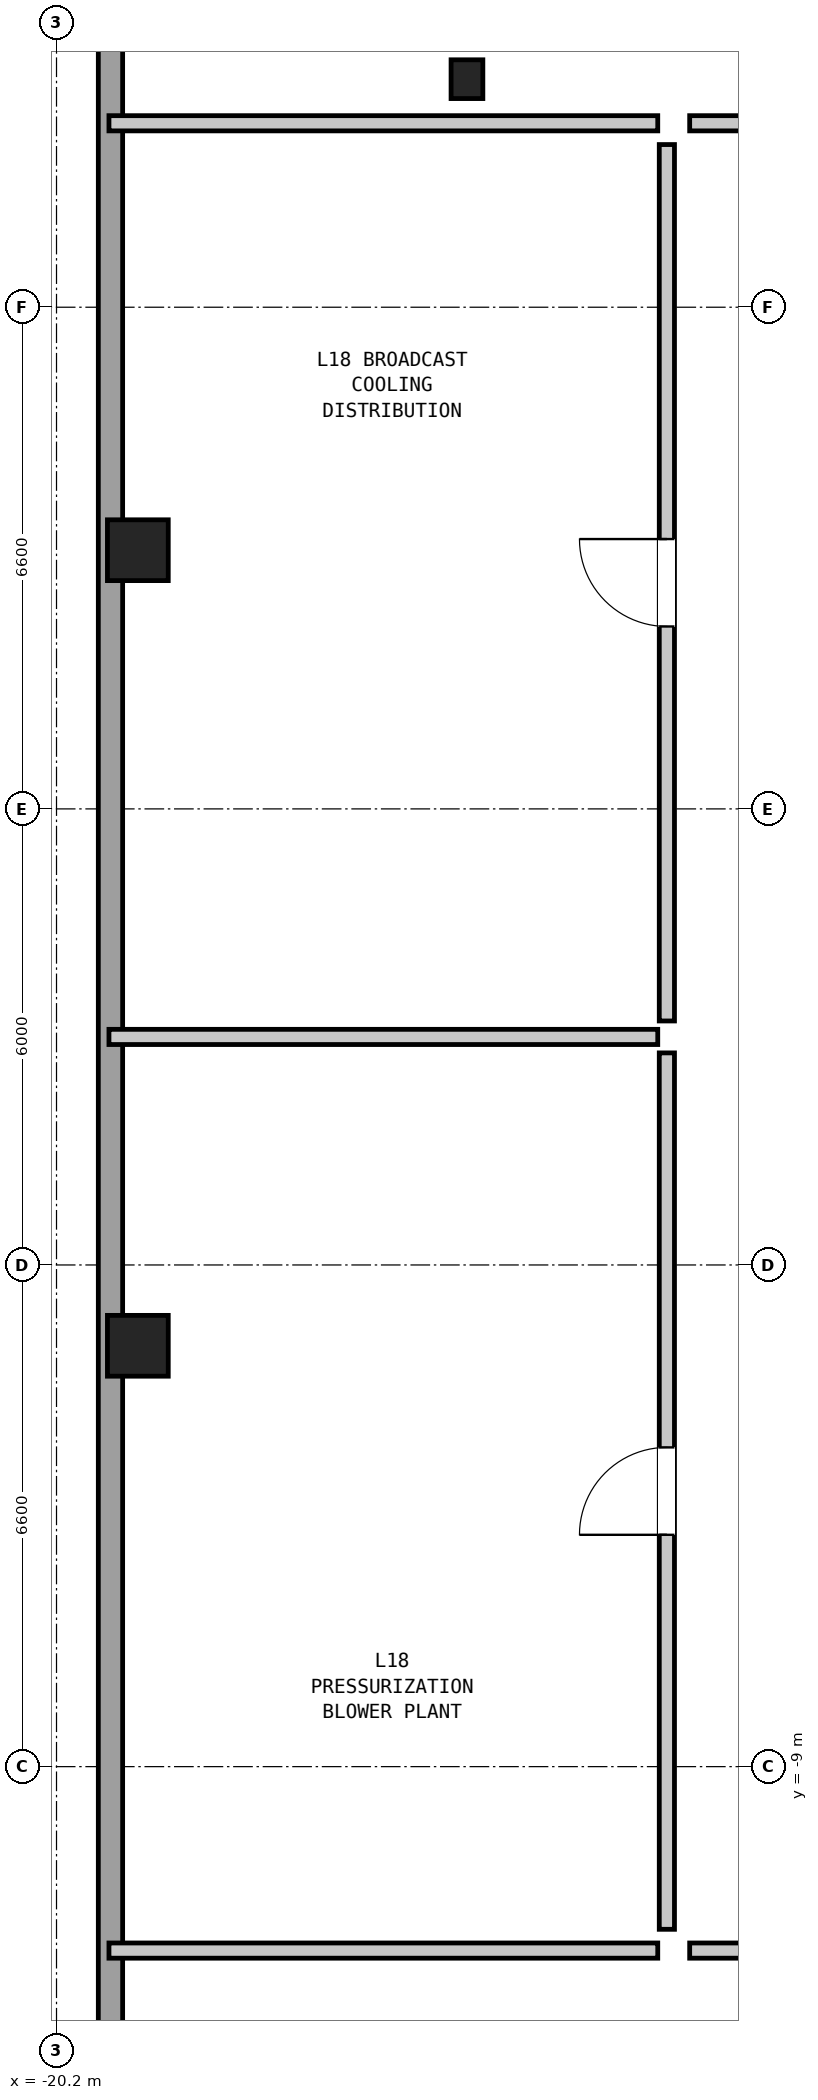
"""IFC4 building model, lengths in metres.
Left out: names, types, materials, properties, quantities, classifications, styles, units other than length and angle.
Written with IfcOpenShell. Run it as: python <this file> out.ifc"""

import sys

from ifc_helpers import new_model, si_unit, direction, frame, frame_2d, origin, origin_2d, place, context, subcontext, project, spatial, rectangle, hollow_rectangle, i_section, extrude, element, fill, save


model = new_model("IFC4")
c1 = context("Model", 3, precision=1e-05, world=origin(), true_north=direction((0.0, 1.0)))
c2 = subcontext(c1, "Body", "Model", "MODEL_VIEW")
j1 = project(units=[si_unit("LENGTHUNIT", "METRE"), si_unit("PLANEANGLEUNIT", "RADIAN")], contexts=[c1])
p1 = place(None, origin())
s1 = spatial("IfcSite", under=j1, at=p1, CompositionType="ELEMENT")
p2 = place(p1, origin())
s2 = spatial("IfcBuilding", under=s1, at=p2, CompositionType="ELEMENT")
p3 = place(p2, frame((0.0, 0.0, 65.1)))
s3 = spatial("IfcBuildingStorey", under=s2, at=p3, CompositionType="ELEMENT", Elevation=65.1)
for number, where, z_axis, x_axis in (
    (1, (-19.13, 7.003, 0.0), (0.0, 0.0, 1.0), (0.0, 1.0, 0.0)),
    (2, (-19.13, -3.463, 0.0), (0.0, 0.0, 1.0), (0.0, 1.0, 0.0)),
):
    element("IfcColumn", number, at=place(p3, frame(where, z_axis=z_axis, x_axis=x_axis)), inside=s3, PredefinedType="COLUMN", context=c2, shape_type="SweptSolid", body=[
        extrude(hollow_rectangle(XDim=0.8, YDim=0.8, WallThickness=0.05, at=origin_2d()), origin(), (0.0, 0.0, 1.0), 4.35),
    ])
p4 = place(p3, frame((-14.8, 13.2, 0.0), z_axis=(0.0, 0.0, 1.0), x_axis=(1.0, 0.0, 0.0)))
e3 = element("IfcColumn", 3, at=p4, inside=s3, PredefinedType="COLUMN", context=c2, shape_type="SweptSolid", body=[
    extrude(i_section(OverallWidth=0.418, OverallDepth=0.51, WebThickness=0.042, FlangeThickness=0.068, at=origin_2d()), origin(), (0.0, 0.0, 1.0), 4.35),
])
p5 = place(p3, frame((-19.49, -13.542, 0.0), z_axis=(0.0, 0.0, 1.0), x_axis=(0.0, 1.0, 0.0)))
e4 = element("IfcWall", 4, at=p5, inside=s3, PredefinedType="SOLIDWALL", context=c2, shape_type="SweptSolid", body=[
    extrude(rectangle(XDim=30.624, YDim=0.32, at=frame_2d((15.312, 0.0))), origin(), (0.0, 0.0, 1.0), 2.31),
])
p6 = place(p3, frame((-11.87, 12.62, 0.0), z_axis=(0.0, 0.0, 1.0), x_axis=(1.0, 0.0, 0.0)))
e5 = element("IfcWall", 5, at=p6, inside=s3, PredefinedType="PARTITIONING", context=c2, shape_type="SweptSolid", body=[
    extrude(rectangle(XDim=5.89, YDim=0.2, at=frame_2d((2.945, 0.0))), origin(), (0.0, 0.0, 1.0), 4.13),
])
p7 = place(p6, frame((2.37, 0.0, 0.0)))
e6 = element("IfcOpeningElement", 6, at=p7, cuts=e5, PredefinedType="OPENING", context=c2, shape_type="SweptSolid", body=[
    extrude(rectangle(XDim=1.15, YDim=2.1, at=frame_2d((0.575, 1.05))), frame((0.0, 0.112, 0.0), z_axis=(0.0, -1.0, 0.0), x_axis=(1.0, 0.0, 0.0)), (0.0, 0.0, 1.0), 0.224),
])
p8 = place(p3, frame((-11.87, -11.42, 0.0), z_axis=(0.0, 0.0, 1.0), x_axis=(1.0, 0.0, 0.0)))
e7 = element("IfcWall", 7, at=p8, inside=s3, PredefinedType="PARTITIONING", context=c2, shape_type="SweptSolid", body=[
    extrude(rectangle(XDim=5.89, YDim=0.2, at=frame_2d((2.945, 0.0))), origin(), (0.0, 0.0, 1.0), 3.574),
])
p9 = place(p8, frame((2.37, 0.0, 0.0)))
e8 = element("IfcOpeningElement", 8, at=p9, cuts=e7, PredefinedType="OPENING", context=c2, shape_type="SweptSolid", body=[
    extrude(rectangle(XDim=1.15, YDim=2.1, at=frame_2d((0.575, 1.05))), frame((0.0, 0.112, 0.0), z_axis=(0.0, -1.0, 0.0), x_axis=(1.0, 0.0, 0.0)), (0.0, 0.0, 1.0), 0.224),
])
p10 = place(p3, frame((-19.51, 12.62, 0.0), z_axis=(0.0, 0.0, 1.0), x_axis=(1.0, 0.0, 0.0)))
e9 = element("IfcWall", 9, at=p10, inside=s3, PredefinedType="PARTITIONING", context=c2, shape_type="SweptSolid", body=[
    extrude(rectangle(XDim=7.22, YDim=0.2, at=frame_2d((3.61, 0.0))), origin(), (0.0, 0.0, 1.0), 4.13),
])
p11 = place(p3, frame((-19.51, -11.42, 0.0), z_axis=(0.0, 0.0, 1.0), x_axis=(1.0, 0.0, 0.0)))
e10 = element("IfcWall", 10, at=p11, inside=s3, PredefinedType="PARTITIONING", context=c2, shape_type="SweptSolid", body=[
    extrude(rectangle(XDim=7.22, YDim=0.2, at=frame_2d((3.61, 0.0))), origin(), (0.0, 0.0, 1.0), 3.574),
])
p12 = place(p3, frame((-19.51, 0.6, 0.0), z_axis=(0.0, 0.0, 1.0), x_axis=(1.0, 0.0, 0.0)))
e11 = element("IfcWall", 11, at=p12, inside=s3, PredefinedType="PARTITIONING", context=c2, shape_type="SweptSolid", body=[
    extrude(rectangle(XDim=7.22, YDim=0.2, at=frame_2d((3.61, 0.0))), origin(), (0.0, 0.0, 1.0), 2.31),
])
p13 = place(p3, frame((-12.17, -11.14, 0.0), z_axis=(0.0, 0.0, 1.0), x_axis=(0.0, 1.0, 0.0)))
e12 = element("IfcWall", 12, at=p13, inside=s3, PredefinedType="PARTITIONING", context=c2, shape_type="SweptSolid", body=[
    extrude(rectangle(XDim=11.53, YDim=0.2, at=frame_2d((5.765, 0.0))), origin(), (0.0, 0.0, 1.0), 2.31),
])
p14 = place(p13, frame((5.19, 0.0, 0.0)))
e13 = element("IfcOpeningElement", 13, at=p14, cuts=e12, PredefinedType="OPENING", context=c2, shape_type="SweptSolid", body=[
    extrude(rectangle(XDim=1.15, YDim=2.1, at=frame_2d((0.575, 1.05))), frame((0.0, 0.112, 0.0), z_axis=(0.0, -1.0, 0.0), x_axis=(1.0, 0.0, 0.0)), (0.0, 0.0, 1.0), 0.224),
])
p15 = place(p3, frame((-12.17, 0.81, 0.0), z_axis=(0.0, 0.0, 1.0), x_axis=(0.0, 1.0, 0.0)))
e14 = element("IfcWall", 14, at=p15, inside=s3, PredefinedType="PARTITIONING", context=c2, shape_type="SweptSolid", body=[
    extrude(rectangle(XDim=11.53, YDim=0.2, at=frame_2d((5.765, 0.0))), origin(), (0.0, 0.0, 1.0), 4.13),
])
p16 = place(p15, frame((5.19, 0.0, 0.0)))
e15 = element("IfcOpeningElement", 15, at=p16, cuts=e14, PredefinedType="OPENING", context=c2, shape_type="SweptSolid", body=[
    extrude(rectangle(XDim=1.15, YDim=2.1, at=frame_2d((0.575, 1.05))), frame((0.0, 0.112, 0.0), z_axis=(0.0, -1.0, 0.0), x_axis=(1.0, 0.0, 0.0)), (0.0, 0.0, 1.0), 0.224),
])
p17 = place(p14, origin())
e16 = element("IfcDoor", 16, at=p17, inside=s3, OperationType="SINGLE_SWING_LEFT", PredefinedType="DOOR", context=c2, shape_type="SweptSolid", body=[
    extrude(rectangle(XDim=1.15, YDim=2.1, at=frame_2d((0.575, 1.05))), frame((0.0, 0.025, 0.0), z_axis=(0.0, -1.0, 0.0), x_axis=(1.0, 0.0, 0.0)), (0.0, 0.0, 1.0), 0.05),
])
fill(e13, e16)
p18 = place(p16, origin())
e17 = element("IfcDoor", 17, at=p18, inside=s3, OperationType="SINGLE_SWING_RIGHT", PredefinedType="DOOR", context=c2, shape_type="SweptSolid", body=[
    extrude(rectangle(XDim=1.15, YDim=2.1, at=frame_2d((0.575, 1.05))), frame((0.0, 0.025, 0.0), z_axis=(0.0, -1.0, 0.0), x_axis=(1.0, 0.0, 0.0)), (0.0, 0.0, 1.0), 0.05),
])
fill(e15, e17)
save(model, sys.argv[1])
